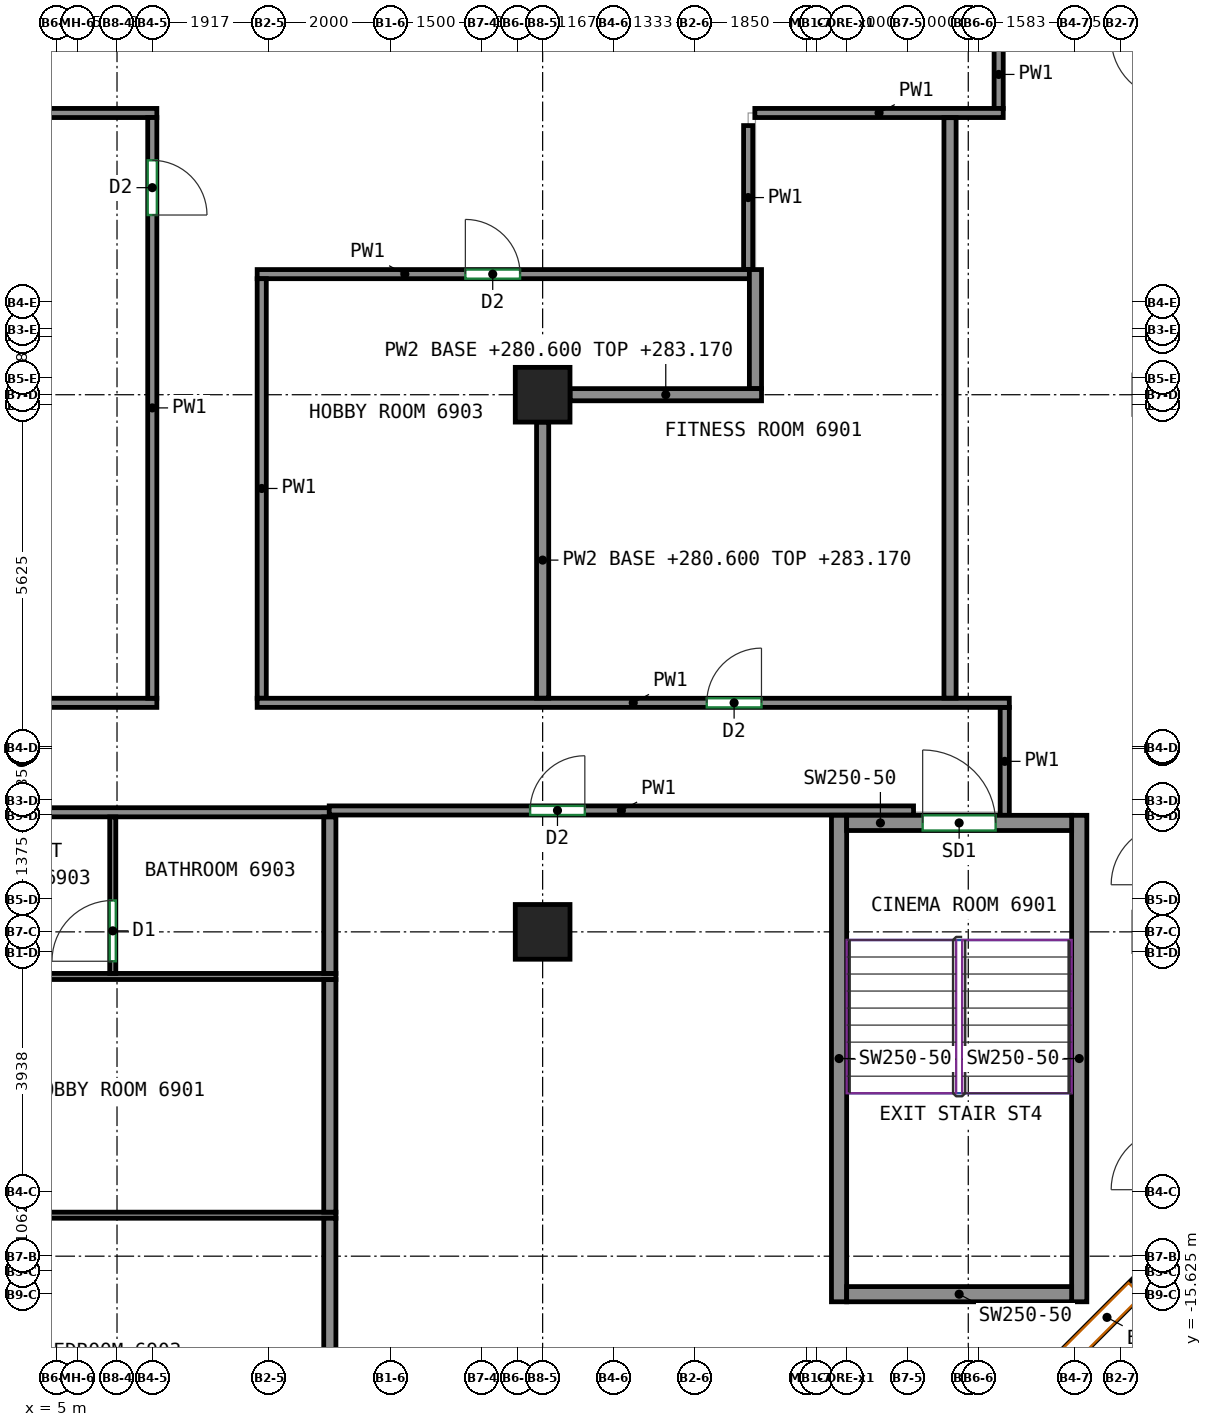
"""IFC4 building model, lengths in metres.
Left out: names, types, materials, properties, quantities, classifications, styles, units other than length and angle.
Written with IfcOpenShell. Run it as: python <this file> out.ifc"""

import sys

from ifc_helpers import new_model, si_unit, direction, frame, frame_2d, origin, origin_2d, place, context, subcontext, project, spatial, rectangle, extrude, source, transform, mapped, element, fill, save


model = new_model("IFC4")
c1 = context("Model", 3, precision=1e-05, world=origin(), true_north=direction((0.0, 1.0)))
c2 = subcontext(c1, "Body", "Model", "MODEL_VIEW")
j1 = project(units=[si_unit("LENGTHUNIT", "METRE"), si_unit("PLANEANGLEUNIT", "RADIAN")], contexts=[c1])
p1 = place(None, origin())
s1 = spatial("IfcSite", under=j1, at=p1, CompositionType="ELEMENT")
p2 = place(p1, origin())
s2 = spatial("IfcBuilding", under=s1, at=p2, CompositionType="ELEMENT")
p3 = place(p2, frame((0.0, 0.0, 280.6)))
s3 = spatial("IfcBuildingStorey", under=s2, at=p3, CompositionType="ELEMENT", Elevation=280.6)
m1 = source(origin(), c2, "Body", "SweptSolid", [
    extrude(rectangle(XDim=0.9, YDim=0.9, at=origin_2d()), origin(), (0.0, 0.0, 1.0), 3.12),
])
for number, where, z_axis, x_axis in (
    (1, (13.0, -9.667, 0.0), (0.0, 0.0, 1.0), (1.0, 0.0, 0.0)),
    (2, (13.0, -0.833, 0.0), (0.0, 0.0, 1.0), (1.0, 0.0, 0.0)),
):
    element("IfcColumn", number, at=place(p3, frame(where, z_axis=z_axis, x_axis=x_axis)), inside=s3, PredefinedType="COLUMN", context=c2, shape_type="MappedRepresentation", body=[
        mapped(m1, transform((0.0, 0.0, 0.0))),
    ])
m2 = source(origin(), c2, "Body", "SweptSolid", [
    extrude(rectangle(XDim=8.0, YDim=0.25, at=frame_2d((4.0, 0.0))), origin(), (0.0, 0.0, 1.0), 3.12),
])
for number, where, z_axis, x_axis in (
    (3, (17.875, -15.75, 0.0), (0.0, 0.0, 1.0), (0.0, 1.0, 0.0)),
    (4, (21.825, -15.75, 0.0), (0.0, 0.0, 1.0), (0.0, 1.0, 0.0)),
):
    element("IfcWall", number, at=place(p3, frame(where, z_axis=z_axis, x_axis=x_axis)), inside=s3, PredefinedType="SHEAR", context=c2, shape_type="MappedRepresentation", body=[
        mapped(m2, transform((0.0, 0.0, 0.0))),
    ])
m3 = source(origin(), c2, "Body", "SweptSolid", [
    extrude(rectangle(XDim=3.7, YDim=0.25, at=frame_2d((1.85, 0.0))), origin(), (0.0, 0.0, 1.0), 3.12),
])
p4 = place(p3, frame((18.0, -15.625, 0.0), z_axis=(0.0, 0.0, 1.0), x_axis=(1.0, 0.0, 0.0)))
e5 = element("IfcWall", 5, at=p4, inside=s3, PredefinedType="SHEAR", context=c2, shape_type="MappedRepresentation", body=[
    mapped(m3, transform((0.0, 0.0, 0.0))),
])
p5 = place(p3, frame((18.0, -7.875, 0.0), z_axis=(0.0, 0.0, 1.0), x_axis=(1.0, 0.0, 0.0)))
e6 = element("IfcWall", 6, at=p5, inside=s3, PredefinedType="SHEAR", context=c2, shape_type="MappedRepresentation", body=[
    mapped(m3, transform((0.0, 0.0, 0.0))),
])
p6 = place(p5, frame((1.25, 0.0, 0.0)))
e7 = element("IfcOpeningElement", 7, at=p6, cuts=e6, PredefinedType="OPENING", context=c2, shape_type="SweptSolid", body=[
    extrude(rectangle(XDim=1.2, YDim=2.1, at=frame_2d((0.6, 1.05))), frame((0.0, 0.135, 0.0), z_axis=(0.0, -1.0, 0.0), x_axis=(1.0, 0.0, 0.0)), (0.0, 0.0, 1.0), 0.27),
])
m4 = source(origin(), c2, "Body", "SweptSolid", [
    extrude(rectangle(XDim=3.712, YDim=0.3, at=frame_2d((1.856, 0.0))), origin(), (0.0, 0.0, 1.0), 3.12),
])
p7 = place(p3, frame((20.444, -17.844, 0.0), z_axis=(0.0, 0.0, 1.0), x_axis=(0.707106781187, 0.707106781187, 0.0)))
e8 = element("IfcWall", 8, at=p7, inside=s3, PredefinedType="SOLIDWALL", context=c2, shape_type="MappedRepresentation", body=[
    mapped(m4, transform((0.0, 0.0, 0.0))),
])
p8 = place(p7, frame((1.75, 0.0, 0.8)))
e9 = element("IfcOpeningElement", 9, at=p8, cuts=e8, PredefinedType="OPENING", context=c2, shape_type="SweptSolid", body=[
    extrude(rectangle(XDim=1.5, YDim=2.05, at=frame_2d((0.75, 1.025))), frame((0.0, 0.16, 0.0), z_axis=(0.0, -1.0, 0.0), x_axis=(1.0, 0.0, 0.0)), (0.0, 0.0, 1.0), 0.32),
])
p9 = place(p7, frame((0.45, 0.0, 0.0)))
e10 = element("IfcOpeningElement", 10, at=p9, cuts=e8, PredefinedType="OPENING", context=c2, shape_type="SweptSolid", body=[
    extrude(rectangle(XDim=1.0, YDim=2.1, at=frame_2d((0.5, 1.05))), frame((0.0, 0.16, 0.0), z_axis=(0.0, -1.0, 0.0), x_axis=(1.0, 0.0, 0.0)), (0.0, 0.0, 1.0), 0.32),
])
p10 = place(p3, frame((-19.0, -5.9, 0.0), z_axis=(0.0, 0.0, 1.0), x_axis=(1.0, 0.0, 0.0)))
e11 = element("IfcWall", 11, at=p10, inside=s3, PredefinedType="PARTITIONING", context=c2, shape_type="SweptSolid", body=[
    extrude(rectangle(XDim=25.655, YDim=0.15, at=frame_2d((12.828, 0.0))), origin(), (0.0, 0.0, 1.0), 3.12),
])
p11 = place(p10, frame((4.394, 0.0, 0.0)))
e12 = element("IfcOpeningElement", 12, at=p11, cuts=e11, PredefinedType="OPENING", context=c2, shape_type="SweptSolid", body=[
    extrude(rectangle(XDim=0.9, YDim=2.1, at=frame_2d((0.45, 1.05))), frame((0.0, 0.085, 0.0), z_axis=(0.0, -1.0, 0.0), x_axis=(1.0, 0.0, 0.0)), (0.0, 0.0, 1.0), 0.17),
])
p12 = place(p3, frame((-11.51, -7.7, 0.0), z_axis=(0.0, 0.0, 1.0), x_axis=(1.0, 0.0, 0.0)))
e13 = element("IfcWall", 13, at=p12, inside=s3, PredefinedType="PARTITIONING", context=c2, shape_type="SweptSolid", body=[
    extrude(rectangle(XDim=21.02, YDim=0.15, at=frame_2d((10.51, 0.0))), origin(), (0.0, 0.0, 1.0), 3.12),
])
p13 = place(p12, frame((3.24, 0.0, 0.0)))
e14 = element("IfcOpeningElement", 14, at=p13, cuts=e13, PredefinedType="OPENING", context=c2, shape_type="SweptSolid", body=[
    extrude(rectangle(XDim=1.0, YDim=2.1, at=frame_2d((0.5, 1.05))), frame((0.0, 0.085, 0.0), z_axis=(0.0, -1.0, 0.0), x_axis=(1.0, 0.0, 0.0)), (0.0, 0.0, 1.0), 0.17),
])
p14 = place(p12, frame((14.321, 0.0, 0.0)))
e15 = element("IfcOpeningElement", 15, at=p14, cuts=e13, PredefinedType="OPENING", context=c2, shape_type="SweptSolid", body=[
    extrude(rectangle(XDim=1.0, YDim=2.1, at=frame_2d((0.5, 1.05))), frame((0.0, 0.085, 0.0), z_axis=(0.0, -1.0, 0.0), x_axis=(1.0, 0.0, 0.0)), (0.0, 0.0, 1.0), 0.17),
])
p15 = place(p3, frame((20.5, 3.875, 0.0), z_axis=(0.0, 0.0, 1.0), x_axis=(0.0, 1.0, 0.0)))
e16 = element("IfcWall", 16, at=p15, inside=s3, PredefinedType="PARTITIONING", context=c2, shape_type="SweptSolid", body=[
    extrude(rectangle(XDim=1.118, YDim=0.15, at=frame_2d((0.559, 0.0))), origin(), (0.0, 0.0, 1.0), 3.12),
])
p16 = place(p3, frame((20.6, -7.75, 0.0), z_axis=(0.0, 0.0, 1.0), x_axis=(0.0, 1.0, 0.0)))
e17 = element("IfcWall", 17, at=p16, inside=s3, PredefinedType="PARTITIONING", context=c2, shape_type="SweptSolid", body=[
    extrude(rectangle(XDim=1.775, YDim=0.15, at=frame_2d((0.887, 0.0))), origin(), (0.0, 0.0, 1.0), 3.12),
])
p17 = place(p3, frame((9.49, -7.67, 0.0), z_axis=(0.0, 0.0, 1.0), x_axis=(1.0, 0.0, 0.0)))
e18 = element("IfcWall", 18, at=p17, inside=s3, PredefinedType="PARTITIONING", context=c2, shape_type="SweptSolid", body=[
    extrude(rectangle(XDim=9.61, YDim=0.15, at=frame_2d((4.805, 0.0))), origin(), (0.0, 0.0, 1.0), 3.12),
])
p18 = place(p17, frame((3.304, 0.0, 0.0)))
e19 = element("IfcOpeningElement", 19, at=p18, cuts=e18, PredefinedType="OPENING", context=c2, shape_type="SweptSolid", body=[
    extrude(rectangle(XDim=0.9, YDim=2.1, at=frame_2d((0.45, 1.05))), frame((0.0, 0.085, 0.0), z_axis=(0.0, -1.0, 0.0), x_axis=(1.0, 0.0, 0.0)), (0.0, 0.0, 1.0), 0.17),
])
p19 = place(p3, frame((-3.075, 3.8, 0.0), z_axis=(0.0, 0.0, 1.0), x_axis=(1.0, 0.0, 0.0)))
e20 = element("IfcWall", 20, at=p19, inside=s3, PredefinedType="PARTITIONING", context=c2, shape_type="SweptSolid", body=[
    extrude(rectangle(XDim=9.73, YDim=0.15, at=frame_2d((4.865, 0.0))), origin(), (0.0, 0.0, 1.0), 3.12),
])
p20 = place(p3, frame((6.58, 3.725, 0.0), z_axis=(0.0, 0.0, 1.0), x_axis=(0.0, -1.0, 0.0)))
e21 = element("IfcWall", 21, at=p20, inside=s3, PredefinedType="PARTITIONING", context=c2, shape_type="SweptSolid", body=[
    extrude(rectangle(XDim=9.55, YDim=0.15, at=frame_2d((4.775, 0.0))), origin(), (0.0, 0.0, 1.0), 3.12),
])
p21 = place(p20, frame((0.703, 0.0, 0.0)))
e22 = element("IfcOpeningElement", 22, at=p21, cuts=e21, PredefinedType="OPENING", context=c2, shape_type="SweptSolid", body=[
    extrude(rectangle(XDim=0.9, YDim=2.1, at=frame_2d((0.45, 1.05))), frame((0.0, 0.085, 0.0), z_axis=(0.0, -1.0, 0.0), x_axis=(1.0, 0.0, 0.0)), (0.0, 0.0, 1.0), 0.17),
])
p22 = place(p3, frame((16.38, 1.225, 0.0), z_axis=(0.0, 0.0, 1.0), x_axis=(0.0, 1.0, 0.0)))
e23 = element("IfcWall", 23, at=p22, inside=s3, PredefinedType="PARTITIONING", context=c2, shape_type="SweptSolid", body=[
    extrude(rectangle(XDim=2.368, YDim=0.15, at=frame_2d((1.184, 0.0))), origin(), (0.0, 0.0, 1.0), 3.12),
])
p23 = place(p3, frame((8.305, 1.15, 0.0), z_axis=(0.0, 0.0, 1.0), x_axis=(1.0, 0.0, 0.0)))
e24 = element("IfcWall", 24, at=p23, inside=s3, PredefinedType="PARTITIONING", context=c2, shape_type="SweptSolid", body=[
    extrude(rectangle(XDim=8.095, YDim=0.15, at=frame_2d((4.047, 0.0))), origin(), (0.0, 0.0, 1.0), 3.12),
])
p24 = place(p23, frame((3.424, 0.0, 0.0)))
e25 = element("IfcOpeningElement", 25, at=p24, cuts=e24, PredefinedType="OPENING", context=c2, shape_type="SweptSolid", body=[
    extrude(rectangle(XDim=0.9, YDim=2.1, at=frame_2d((0.45, 1.05))), frame((0.0, 0.085, 0.0), z_axis=(0.0, -1.0, 0.0), x_axis=(1.0, 0.0, 0.0)), (0.0, 0.0, 1.0), 0.17),
])
p25 = place(p3, frame((8.38, -5.825, 0.0), z_axis=(0.0, 0.0, 1.0), x_axis=(0.0, 1.0, 0.0)))
e26 = element("IfcWall", 26, at=p25, inside=s3, PredefinedType="PARTITIONING", context=c2, shape_type="SweptSolid", body=[
    extrude(rectangle(XDim=6.9, YDim=0.15, at=frame_2d((3.45, 0.0))), origin(), (0.0, 0.0, 1.0), 3.12),
])
p26 = place(p3, frame((8.305, -5.9, 0.0), z_axis=(0.0, 0.0, 1.0), x_axis=(1.0, 0.0, 0.0)))
e27 = element("IfcWall", 27, at=p26, inside=s3, PredefinedType="PARTITIONING", context=c2, shape_type="SweptSolid", body=[
    extrude(rectangle(XDim=12.37, YDim=0.15, at=frame_2d((6.185, 0.0))), origin(), (0.0, 0.0, 1.0), 3.12),
])
p27 = place(p26, frame((7.394, 0.0, 0.0)))
e28 = element("IfcOpeningElement", 28, at=p27, cuts=e27, PredefinedType="OPENING", context=c2, shape_type="SweptSolid", body=[
    extrude(rectangle(XDim=0.9, YDim=2.1, at=frame_2d((0.45, 1.05))), frame((0.0, 0.085, 0.0), z_axis=(0.0, -1.0, 0.0), x_axis=(1.0, 0.0, 0.0)), (0.0, 0.0, 1.0), 0.17),
])
p28 = place(p3, frame((16.49, 3.8, 0.0), z_axis=(0.0, 0.0, 1.0), x_axis=(1.0, 0.0, 0.0)))
e29 = element("IfcWall", 29, at=p28, inside=s3, PredefinedType="PARTITIONING", context=c2, shape_type="SweptSolid", body=[
    extrude(rectangle(XDim=4.085, YDim=0.15, at=frame_2d((2.042, 0.0))), origin(), (0.0, 0.0, 1.0), 3.12),
])
p29 = place(p3, frame((-11.5, -10.4, 0.0), z_axis=(0.0, 0.0, 1.0), x_axis=(1.0, 0.0, 0.0)))
e30 = element("IfcWall", 30, at=p29, inside=s3, PredefinedType="PARTITIONING", context=c2, shape_type="SweptSolid", body=[
    extrude(rectangle(XDim=21.1, YDim=0.1, at=frame_2d((10.55, 0.0))), origin(), (0.0, 0.0, 1.0), 3.12),
])
p30 = place(p29, frame((4.05, 0.0, 0.0)))
e31 = element("IfcOpeningElement", 31, at=p30, cuts=e30, PredefinedType="OPENING", context=c2, shape_type="SweptSolid", body=[
    extrude(rectangle(XDim=1.0, YDim=2.1, at=frame_2d((0.5, 1.05))), frame((0.0, 0.06, 0.0), z_axis=(0.0, -1.0, 0.0), x_axis=(1.0, 0.0, 0.0)), (0.0, 0.0, 1.0), 0.12),
])
p31 = place(p29, frame((11.727, 0.0, 0.0)))
e32 = element("IfcOpeningElement", 32, at=p31, cuts=e30, PredefinedType="OPENING", context=c2, shape_type="SweptSolid", body=[
    extrude(rectangle(XDim=0.9, YDim=2.1, at=frame_2d((0.45, 1.05))), frame((0.0, 0.06, 0.0), z_axis=(0.0, -1.0, 0.0), x_axis=(1.0, 0.0, 0.0)), (0.0, 0.0, 1.0), 0.12),
])
p32 = place(p29, frame((15.225, 0.0, 0.0)))
e33 = element("IfcOpeningElement", 33, at=p32, cuts=e30, PredefinedType="OPENING", context=c2, shape_type="SweptSolid", body=[
    extrude(rectangle(XDim=1.0, YDim=2.1, at=frame_2d((0.5, 1.05))), frame((0.0, 0.06, 0.0), z_axis=(0.0, -1.0, 0.0), x_axis=(1.0, 0.0, 0.0)), (0.0, 0.0, 1.0), 0.12),
])
p33 = place(p3, frame((5.93, -10.35, 0.0), z_axis=(0.0, 0.0, 1.0), x_axis=(0.0, 1.0, 0.0)))
e34 = element("IfcWall", 34, at=p33, inside=s3, PredefinedType="PARTITIONING", context=c2, shape_type="SweptSolid", body=[
    extrude(rectangle(XDim=2.573, YDim=0.1, at=frame_2d((1.287, 0.0))), origin(), (0.0, 0.0, 1.0), 3.12),
])
p34 = place(p33, frame((0.2, 0.0, 0.0)))
e35 = element("IfcOpeningElement", 35, at=p34, cuts=e34, PredefinedType="OPENING", context=c2, shape_type="SweptSolid", body=[
    extrude(rectangle(XDim=1.0, YDim=2.1, at=frame_2d((0.5, 1.05))), frame((0.0, 0.06, 0.0), z_axis=(0.0, -1.0, 0.0), x_axis=(1.0, 0.0, 0.0)), (0.0, 0.0, 1.0), 0.12),
])
p35 = place(p3, frame((9.5, -10.35, 0.0), z_axis=(0.0, 0.0, 1.0), x_axis=(0.0, 1.0, 0.0)))
e36 = element("IfcWall", 36, at=p35, inside=s3, PredefinedType="PARTITIONING", context=c2, shape_type="SweptSolid", body=[
    extrude(rectangle(XDim=2.573, YDim=0.2, at=frame_2d((1.287, 0.0))), origin(), (0.0, 0.0, 1.0), 3.12),
])
p36 = place(p3, frame((9.6, -14.326, 0.0), z_axis=(0.0, 0.0, 1.0), x_axis=(-1.0, 0.0, 0.0)))
e37 = element("IfcWall", 37, at=p36, inside=s3, PredefinedType="PARTITIONING", context=c2, shape_type="SweptSolid", body=[
    extrude(rectangle(XDim=7.15, YDim=0.1, at=frame_2d((3.575, 0.0))), origin(), (0.0, 0.0, 1.0), 3.12),
])
p37 = place(p3, frame((9.5, -18.25, 0.0), z_axis=(0.0, 0.0, 1.0), x_axis=(0.0, 1.0, 0.0)))
e38 = element("IfcWall", 38, at=p37, inside=s3, PredefinedType="PARTITIONING", context=c2, shape_type="SweptSolid", body=[
    extrude(rectangle(XDim=3.874, YDim=0.2, at=frame_2d((1.937, 0.0))), origin(), (0.0, 0.0, 1.0), 3.12),
])
p38 = place(p3, frame((9.5, -14.276, 0.0), z_axis=(0.0, 0.0, 1.0), x_axis=(0.0, 1.0, 0.0)))
e39 = element("IfcWall", 39, at=p38, inside=s3, PredefinedType="PARTITIONING", context=c2, shape_type="SweptSolid", body=[
    extrude(rectangle(XDim=3.824, YDim=0.2, at=frame_2d((1.912, 0.0))), origin(), (0.0, 0.0, 1.0), 3.12),
])
p39 = place(p3, frame((19.7, 3.723, 0.0), z_axis=(0.0, 0.0, 1.0), x_axis=(0.0, -1.0, 0.0)))
e40 = element("IfcWall", 40, at=p39, inside=s3, PredefinedType="PARTITIONING", context=c2, shape_type="SweptSolid", body=[
    extrude(rectangle(XDim=9.546, YDim=0.2, at=frame_2d((4.773, 0.0))), origin(), (0.0, 0.0, 1.0), 3.12),
])
p40 = place(p3, frame((16.5, -0.733, 0.0), z_axis=(0.0, 0.0, 1.0), x_axis=(0.0, 1.0, 0.0)))
e41 = element("IfcWall", 41, at=p40, inside=s3, PredefinedType="PARTITIONING", context=c2, shape_type="SweptSolid", body=[
    extrude(rectangle(XDim=1.958, YDim=0.2, at=frame_2d((0.979, 0.0))), origin(), (0.0, 0.0, 1.0), 3.12),
])
p41 = place(p3, frame((13.45, -0.833, 0.0), z_axis=(0.0, 0.0, 1.0), x_axis=(1.0, 0.0, 0.0)))
e42 = element("IfcWall", 42, at=p41, inside=s3, PredefinedType="PARTITIONING", context=c2, shape_type="SweptSolid", body=[
    extrude(rectangle(XDim=3.15, YDim=0.2, at=frame_2d((1.575, 0.0))), origin(), (0.0, 0.0, 1.0), 2.57),
])
p42 = place(p3, frame((13.0, -5.823, 0.0), z_axis=(0.0, 0.0, 1.0), x_axis=(0.0, 1.0, 0.0)))
e43 = element("IfcWall", 43, at=p42, inside=s3, PredefinedType="PARTITIONING", context=c2, shape_type="SweptSolid", body=[
    extrude(rectangle(XDim=4.54, YDim=0.2, at=frame_2d((2.27, 0.0))), origin(), (0.0, 0.0, 1.0), 2.57),
])
p43 = place(p8, origin())
e44 = element("IfcWindow", 44, at=p43, inside=s3, PartitioningType="SINGLE_PANEL", PredefinedType="WINDOW", context=c2, shape_type="SweptSolid", body=[
    extrude(rectangle(XDim=1.5, YDim=2.05, at=frame_2d((0.75, 1.025))), frame((0.0, 0.03, 0.0), z_axis=(0.0, -1.0, 0.0), x_axis=(1.0, 0.0, 0.0)), (0.0, 0.0, 1.0), 0.06),
])
fill(e9, e44)
p44 = place(p6, origin())
e45 = element("IfcDoor", 45, at=p44, inside=s3, OperationType="DOUBLE_DOOR_SINGLE_SWING", PredefinedType="DOOR", context=c2, shape_type="SweptSolid", body=[
    extrude(rectangle(XDim=1.2, YDim=2.1, at=frame_2d((0.6, 1.05))), frame((0.0, 0.025, 0.0), z_axis=(0.0, -1.0, 0.0), x_axis=(1.0, 0.0, 0.0)), (0.0, 0.0, 1.0), 0.05),
])
fill(e7, e45)
p45 = place(p34, origin())
e46 = element("IfcDoor", 46, at=p45, inside=s3, OperationType="SINGLE_SWING_LEFT", PredefinedType="DOOR", context=c2, shape_type="SweptSolid", body=[
    extrude(rectangle(XDim=1.0, YDim=2.1, at=frame_2d((0.5, 1.05))), frame((0.0, 0.025, 0.0), z_axis=(0.0, -1.0, 0.0), x_axis=(1.0, 0.0, 0.0)), (0.0, 0.0, 1.0), 0.05),
])
fill(e35, e46)
p46 = place(p18, origin())
e47 = element("IfcDoor", 47, at=p46, inside=s3, OperationType="SINGLE_SWING_RIGHT", PredefinedType="DOOR", context=c2, shape_type="SweptSolid", body=[
    extrude(rectangle(XDim=0.9, YDim=2.1, at=frame_2d((0.45, 1.05))), frame((0.0, 0.025, 0.0), z_axis=(0.0, -1.0, 0.0), x_axis=(1.0, 0.0, 0.0)), (0.0, 0.0, 1.0), 0.05),
])
fill(e19, e47)
p47 = place(p27, origin())
e48 = element("IfcDoor", 48, at=p47, inside=s3, OperationType="SINGLE_SWING_RIGHT", PredefinedType="DOOR", context=c2, shape_type="SweptSolid", body=[
    extrude(rectangle(XDim=0.9, YDim=2.1, at=frame_2d((0.45, 1.05))), frame((0.0, 0.025, 0.0), z_axis=(0.0, -1.0, 0.0), x_axis=(1.0, 0.0, 0.0)), (0.0, 0.0, 1.0), 0.05),
])
fill(e28, e48)
p48 = place(p24, origin())
e49 = element("IfcDoor", 49, at=p48, inside=s3, OperationType="SINGLE_SWING_LEFT", PredefinedType="DOOR", context=c2, shape_type="SweptSolid", body=[
    extrude(rectangle(XDim=0.9, YDim=2.1, at=frame_2d((0.45, 1.05))), frame((0.0, 0.025, 0.0), z_axis=(0.0, -1.0, 0.0), x_axis=(1.0, 0.0, 0.0)), (0.0, 0.0, 1.0), 0.05),
])
fill(e25, e49)
p49 = place(p21, origin())
e50 = element("IfcDoor", 50, at=p49, inside=s3, OperationType="SINGLE_SWING_RIGHT", PredefinedType="DOOR", context=c2, shape_type="SweptSolid", body=[
    extrude(rectangle(XDim=0.9, YDim=2.1, at=frame_2d((0.45, 1.05))), frame((0.0, 0.025, 0.0), z_axis=(0.0, -1.0, 0.0), x_axis=(1.0, 0.0, 0.0)), (0.0, 0.0, 1.0), 0.05),
])
fill(e22, e50)
save(model, sys.argv[1])
